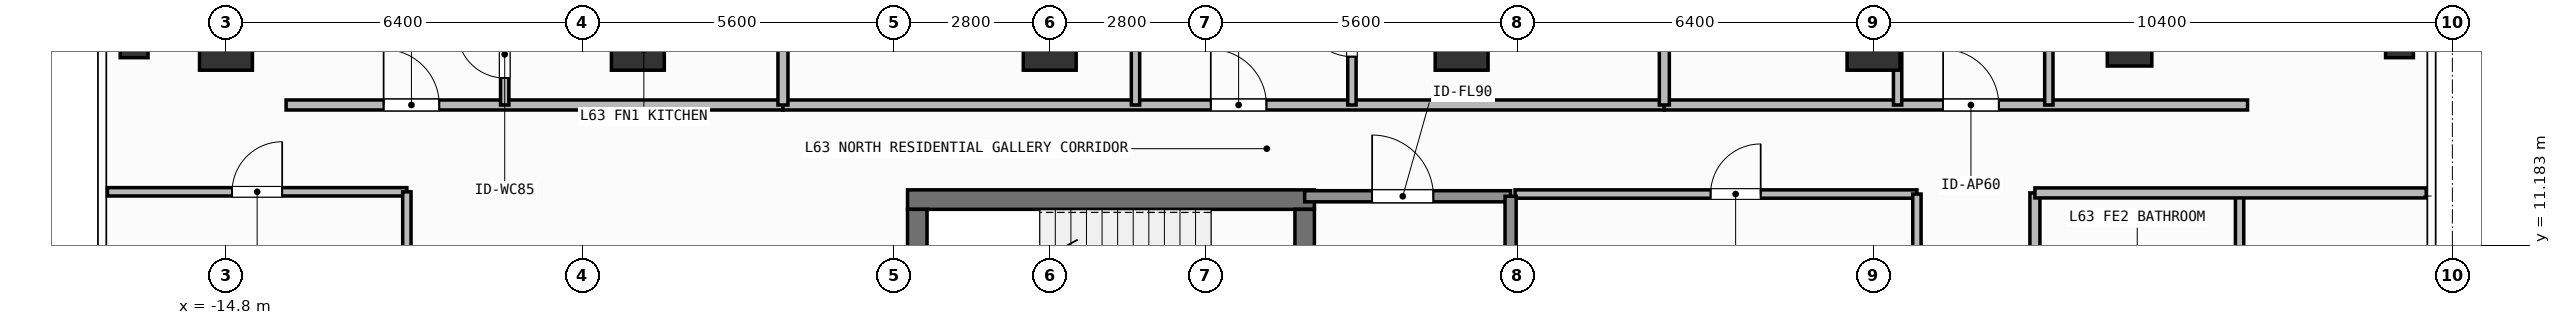
"""IFC4 building model, lengths in metres.
Left out: names, types, materials, properties, quantities, classifications, styles, units other than length and angle.
Written with IfcOpenShell. Run it as: python <this file> out.ifc"""

import sys

from ifc_helpers import new_model, si_unit, direction, frame, frame_2d, origin, origin_2d, place, context, subcontext, project, spatial, rectangle, hollow_rectangle, extrude, element, fill, save


model = new_model("IFC4")
c1 = context("Model", 3, precision=1e-05, world=origin(), true_north=direction((0.0, 1.0)))
c2 = subcontext(c1, "Body", "Model", "MODEL_VIEW")
j1 = project(units=[si_unit("LENGTHUNIT", "METRE"), si_unit("PLANEANGLEUNIT", "RADIAN")], contexts=[c1])
p1 = place(None, origin())
s1 = spatial("IfcSite", under=j1, at=p1, CompositionType="ELEMENT")
p2 = place(p1, origin())
s2 = spatial("IfcBuilding", under=s1, at=p2, CompositionType="ELEMENT")
p3 = place(p2, frame((0.0, 0.0, 258.6)))
s3 = spatial("IfcBuildingStorey", under=s2, at=p3, CompositionType="ELEMENT", Elevation=258.6)
p4 = place(p3, frame((-2.555, 12.0, 0.0), z_axis=(0.0, 0.0, 1.0), x_axis=(1.0, 0.0, 0.0)))
e1 = element("IfcWall", 1, at=p4, inside=s3, PredefinedType="SHEAR", context=c2, shape_type="SweptSolid", body=[
    extrude(rectangle(XDim=7.31, YDim=0.35, at=frame_2d((3.655, 0.0))), origin(), (0.0, 0.0, 1.0), 3.9),
])
p5 = place(p3, frame((-2.38, 8.9, 0.0), z_axis=(0.0, 0.0, 1.0), x_axis=(0.0, 1.0, 0.0)))
e2 = element("IfcWall", 2, at=p5, inside=s3, PredefinedType="SHEAR", context=c2, shape_type="SweptSolid", body=[
    extrude(rectangle(XDim=2.925, YDim=0.35, at=frame_2d((1.462, 0.0))), origin(), (0.0, 0.0, 1.0), 3.9),
])
p6 = place(p3, frame((4.58, 11.825, 0.0), z_axis=(0.0, 0.0, 1.0), x_axis=(0.0, -1.0, 0.0)))
e3 = element("IfcWall", 3, at=p6, inside=s3, PredefinedType="SHEAR", context=c2, shape_type="SweptSolid", body=[
    extrude(rectangle(XDim=2.925, YDim=0.35, at=frame_2d((1.462, 0.0))), origin(), (0.0, 0.0, 1.0), 3.9),
])
p7 = place(p6, frame((0.913, 0.0, 0.0)))
e4 = element("IfcOpeningElement", 4, at=p7, cuts=e3, PredefinedType="OPENING", context=c2, shape_type="SweptSolid", body=[
    extrude(rectangle(XDim=1.1, YDim=2.15, at=frame_2d((0.55, 1.075))), frame((0.0, 0.185, 0.0), z_axis=(0.0, -1.0, 0.0), x_axis=(1.0, 0.0, 0.0)), (0.0, 0.0, 1.0), 0.37),
])
for number, where, z_axis, x_axis in (
    (5, (-14.8, 14.8, 0.0), (0.0, 0.0, 1.0), (1.0, 0.0, 0.0)),
    (6, (-7.4, 14.8, 0.0), (0.0, 0.0, 1.0), (1.0, 0.0, 0.0)),
    (7, (0.0, 14.8, 0.0), (0.0, 0.0, 1.0), (1.0, 0.0, 0.0)),
    (8, (7.4, 14.8, 0.0), (0.0, 0.0, 1.0), (1.0, 0.0, 0.0)),
    (9, (14.8, 14.8, 0.0), (0.0, 0.0, 1.0), (1.0, 0.0, 0.0)),
):
    element("IfcColumn", number, at=place(p3, frame(where, z_axis=z_axis, x_axis=x_axis)), inside=s3, PredefinedType="COLUMN", context=c2, shape_type="SweptSolid", body=[
        extrude(rectangle(XDim=0.95, YDim=0.95, at=origin_2d()), origin(), (0.0, 0.0, 1.0), 3.9),
    ])
p8 = place(p3, frame((19.4, 14.8, 0.0), z_axis=(0.0, 0.0, 1.0), x_axis=(1.0, 0.0, 0.0)))
e10 = element("IfcColumn", 10, at=p8, inside=s3, PredefinedType="COLUMN", context=c2, shape_type="SweptSolid", body=[
    extrude(hollow_rectangle(XDim=0.8, YDim=0.8, WallThickness=0.036, at=origin_2d()), origin(), (0.0, 0.0, 1.0), 3.9),
])
for number, where, z_axis, x_axis in (
    (11, (-16.45, 14.8, 0.0), (0.0, 0.0, 1.0), (1.0, 0.0, 0.0)),
    (12, (24.25, 14.8, 0.0), (0.0, 0.0, 1.0), (1.0, 0.0, 0.0)),
):
    element("IfcColumn", number, at=place(p3, frame(where, z_axis=z_axis, x_axis=x_axis)), inside=s3, PredefinedType="COLUMN", context=c2, shape_type="SweptSolid", body=[
        extrude(hollow_rectangle(XDim=0.5, YDim=0.5, WallThickness=0.025, at=origin_2d()), origin(), (0.0, 0.0, 1.0), 3.9),
    ])
p9 = place(p3, frame((4.58, 12.06, 0.0), z_axis=(0.0, 0.0, 1.0), x_axis=(1.0, 0.0, 0.0)))
e13 = element("IfcWall", 13, at=p9, inside=s3, PredefinedType="SOLIDWALL", context=c2, shape_type="SweptSolid", body=[
    extrude(rectangle(XDim=3.7, YDim=0.2, at=frame_2d((1.85, 0.0))), origin(), (0.0, 0.0, 1.0), 3.68),
])
p10 = place(p9, frame((1.212, 0.0, 0.0)))
e14 = element("IfcOpeningElement", 14, at=p10, cuts=e13, PredefinedType="OPENING", context=c2, shape_type="SweptSolid", body=[
    extrude(rectangle(XDim=1.1, YDim=2.15, at=frame_2d((0.55, 1.075))), frame((0.0, 0.11, 0.0), z_axis=(0.0, -1.0, 0.0), x_axis=(1.0, 0.0, 0.0)), (0.0, 0.0, 1.0), 0.22),
])
p11 = place(p3, frame((8.36, 12.1, 0.0), z_axis=(0.0, 0.0, 1.0), x_axis=(1.0, 0.0, 0.0)))
e15 = element("IfcWall", 15, at=p11, inside=s3, PredefinedType="PARTITIONING", context=c2, shape_type="SweptSolid", body=[
    extrude(rectangle(XDim=7.22, YDim=0.15, at=frame_2d((3.61, 0.0))), origin(), (0.0, 0.0, 1.0), 3.68),
])
p12 = place(p11, frame((3.513, 0.0, 0.0)))
e16 = element("IfcOpeningElement", 16, at=p12, cuts=e15, PredefinedType="OPENING", context=c2, shape_type="SweptSolid", body=[
    extrude(rectangle(XDim=0.9, YDim=2.1, at=frame_2d((0.45, 1.05))), frame((0.0, 0.085, 0.0), z_axis=(0.0, -1.0, 0.0), x_axis=(1.0, 0.0, 0.0)), (0.0, 0.0, 1.0), 0.17),
])
p13 = place(p3, frame((-13.72, 13.7, 0.0), z_axis=(0.0, 0.0, 1.0), x_axis=(1.0, 0.0, 0.0)))
e17 = element("IfcWall", 17, at=p13, inside=s3, PredefinedType="PARTITIONING", context=c2, shape_type="SweptSolid", body=[
    extrude(rectangle(XDim=8.927, YDim=0.18, at=frame_2d((4.463, 0.0))), origin(), (0.0, 0.0, 1.0), 3.68),
])
p14 = place(p13, frame((1.752, 0.0, 0.0)))
e18 = element("IfcOpeningElement", 18, at=p14, cuts=e17, PredefinedType="OPENING", context=c2, shape_type="SweptSolid", body=[
    extrude(rectangle(XDim=1.0, YDim=2.2, at=frame_2d((0.5, 1.1))), frame((0.0, 0.1, 0.0), z_axis=(0.0, -1.0, 0.0), x_axis=(1.0, 0.0, 0.0)), (0.0, 0.0, 1.0), 0.2),
])
p15 = place(p3, frame((-9.792, 13.7, 0.0), z_axis=(0.0, 0.0, 1.0), x_axis=(0.0, 1.0, 0.0)))
e19 = element("IfcWall", 19, at=p15, inside=s3, PredefinedType="PARTITIONING", context=c2, shape_type="SweptSolid", body=[
    extrude(rectangle(XDim=1.982, YDim=0.15, at=frame_2d((0.991, 0.0))), origin(), (0.0, 0.0, 1.0), 3.68),
])
p16 = place(p15, frame((0.485, 0.0, 0.0)))
e20 = element("IfcOpeningElement", 20, at=p16, cuts=e19, PredefinedType="OPENING", context=c2, shape_type="SweptSolid", body=[
    extrude(rectangle(XDim=0.85, YDim=2.1, at=frame_2d((0.425, 1.05))), frame((0.0, 0.085, 0.0), z_axis=(0.0, -1.0, 0.0), x_axis=(1.0, 0.0, 0.0)), (0.0, 0.0, 1.0), 0.17),
])
p17 = place(p3, frame((-4.793, 13.7, 0.0), z_axis=(0.0, 0.0, 1.0), x_axis=(1.0, 0.0, 0.0)))
e21 = element("IfcWall", 21, at=p17, inside=s3, PredefinedType="PARTITIONING", context=c2, shape_type="SweptSolid", body=[
    extrude(rectangle(XDim=15.835, YDim=0.18, at=frame_2d((7.917, 0.0))), origin(), (0.0, 0.0, 1.0), 3.68),
])
p18 = place(p17, frame((7.686, 0.0, 0.0)))
e22 = element("IfcOpeningElement", 22, at=p18, cuts=e21, PredefinedType="OPENING", context=c2, shape_type="SweptSolid", body=[
    extrude(rectangle(XDim=1.0, YDim=2.2, at=frame_2d((0.5, 1.1))), frame((0.0, 0.1, 0.0), z_axis=(0.0, -1.0, 0.0), x_axis=(1.0, 0.0, 0.0)), (0.0, 0.0, 1.0), 0.2),
])
p19 = place(p3, frame((1.541, 13.7, 0.0), z_axis=(0.0, 0.0, 1.0), x_axis=(0.0, 1.0, 0.0)))
e23 = element("IfcWall", 23, at=p19, inside=s3, PredefinedType="PARTITIONING", context=c2, shape_type="SweptSolid", body=[
    extrude(rectangle(XDim=4.147, YDim=0.15, at=frame_2d((2.073, 0.0))), origin(), (0.0, 0.0, 1.0), 3.68),
])
p20 = place(p19, frame((1.736, 0.0, 0.0)))
e24 = element("IfcOpeningElement", 24, at=p20, cuts=e23, PredefinedType="OPENING", context=c2, shape_type="SweptSolid", body=[
    extrude(rectangle(XDim=0.85, YDim=2.1, at=frame_2d((0.425, 1.05))), frame((0.0, 0.085, 0.0), z_axis=(0.0, -1.0, 0.0), x_axis=(1.0, 0.0, 0.0)), (0.0, 0.0, 1.0), 0.17),
])
p21 = place(p3, frame((5.429, 13.7, 0.0), z_axis=(0.0, 0.0, 1.0), x_axis=(0.0, 1.0, 0.0)))
e25 = element("IfcWall", 25, at=p21, inside=s3, PredefinedType="PARTITIONING", context=c2, shape_type="SweptSolid", body=[
    extrude(rectangle(XDim=2.588, YDim=0.15, at=frame_2d((1.294, 0.0))), origin(), (0.0, 0.0, 1.0), 3.68),
])
p22 = place(p21, frame((0.869, 0.0, 0.0)))
e26 = element("IfcOpeningElement", 26, at=p22, cuts=e25, PredefinedType="OPENING", context=c2, shape_type="SweptSolid", body=[
    extrude(rectangle(XDim=0.85, YDim=2.1, at=frame_2d((0.425, 1.05))), frame((0.0, 0.085, 0.0), z_axis=(0.0, -1.0, 0.0), x_axis=(1.0, 0.0, 0.0)), (0.0, 0.0, 1.0), 0.17),
])
p23 = place(p3, frame((11.042, 13.7, 0.0), z_axis=(0.0, 0.0, 1.0), x_axis=(1.0, 0.0, 0.0)))
e27 = element("IfcWall", 27, at=p23, inside=s3, PredefinedType="PARTITIONING", context=c2, shape_type="SweptSolid", body=[
    extrude(rectangle(XDim=10.478, YDim=0.18, at=frame_2d((5.239, 0.0))), origin(), (0.0, 0.0, 1.0), 3.68),
])
p24 = place(p23, frame((5.008, 0.0, 0.0)))
e28 = element("IfcOpeningElement", 28, at=p24, cuts=e27, PredefinedType="OPENING", context=c2, shape_type="SweptSolid", body=[
    extrude(rectangle(XDim=1.0, YDim=2.2, at=frame_2d((0.5, 1.1))), frame((0.0, 0.1, 0.0), z_axis=(0.0, -1.0, 0.0), x_axis=(1.0, 0.0, 0.0)), (0.0, 0.0, 1.0), 0.2),
])
p25 = place(p3, frame((15.233, 13.7, 0.0), z_axis=(0.0, 0.0, 1.0), x_axis=(0.0, 1.0, 0.0)))
e29 = element("IfcWall", 29, at=p25, inside=s3, PredefinedType="PARTITIONING", context=c2, shape_type="SweptSolid", body=[
    extrude(rectangle(XDim=4.25, YDim=0.15, at=frame_2d((2.125, 0.0))), origin(), (0.0, 0.0, 1.0), 3.68),
])
p26 = place(p25, frame((1.7, 0.0, 0.0)))
e30 = element("IfcOpeningElement", 30, at=p26, cuts=e29, PredefinedType="OPENING", context=c2, shape_type="SweptSolid", body=[
    extrude(rectangle(XDim=0.85, YDim=2.1, at=frame_2d((0.425, 1.05))), frame((0.0, 0.085, 0.0), z_axis=(0.0, -1.0, 0.0), x_axis=(1.0, 0.0, 0.0)), (0.0, 0.0, 1.0), 0.17),
])
p27 = place(p3, frame((17.95, 13.7, 0.0), z_axis=(0.0, 0.0, 1.0), x_axis=(0.0, 1.0, 0.0)))
e31 = element("IfcWall", 31, at=p27, inside=s3, PredefinedType="PARTITIONING", context=c2, shape_type="SweptSolid", body=[
    extrude(rectangle(XDim=4.25, YDim=0.15, at=frame_2d((2.125, 0.0))), origin(), (0.0, 0.0, 1.0), 3.68),
])
p28 = place(p27, frame((1.7, 0.0, 0.0)))
e32 = element("IfcOpeningElement", 32, at=p28, cuts=e31, PredefinedType="OPENING", context=c2, shape_type="SweptSolid", body=[
    extrude(rectangle(XDim=0.85, YDim=2.1, at=frame_2d((0.425, 1.05))), frame((0.0, 0.085, 0.0), z_axis=(0.0, -1.0, 0.0), x_axis=(1.0, 0.0, 0.0)), (0.0, 0.0, 1.0), 0.17),
])
p29 = place(p3, frame((-16.93, 12.14, 0.0), z_axis=(0.0, 0.0, 1.0), x_axis=(1.0, 0.0, 0.0)))
e33 = element("IfcWall", 33, at=p29, inside=s3, PredefinedType="PARTITIONING", context=c2, shape_type="SweptSolid", body=[
    extrude(rectangle(XDim=5.38, YDim=0.15, at=frame_2d((2.69, 0.0))), origin(), (0.0, 0.0, 1.0), 3.68),
])
p30 = place(p29, frame((2.24, 0.0, 0.0)))
e34 = element("IfcOpeningElement", 34, at=p30, cuts=e33, PredefinedType="OPENING", context=c2, shape_type="SweptSolid", body=[
    extrude(rectangle(XDim=0.9, YDim=2.1, at=frame_2d((0.45, 1.05))), frame((0.0, 0.085, 0.0), z_axis=(0.0, -1.0, 0.0), x_axis=(1.0, 0.0, 0.0)), (0.0, 0.0, 1.0), 0.17),
])
p31 = place(p3, frame((17.7, 1.454, 0.0), z_axis=(0.0, 0.0, 1.0), x_axis=(0.0, 1.0, 0.0)))
e35 = element("IfcWall", 35, at=p31, inside=s3, PredefinedType="PARTITIONING", context=c2, shape_type="SweptSolid", body=[
    extrude(rectangle(XDim=10.666, YDim=0.18, at=frame_2d((5.333, 0.0))), origin(), (0.0, 0.0, 1.0), 3.68),
])
p32 = place(p31, frame((4.473, 0.0, 0.0)))
e36 = element("IfcOpeningElement", 36, at=p32, cuts=e35, PredefinedType="OPENING", context=c2, shape_type="SweptSolid", body=[
    extrude(rectangle(XDim=1.0, YDim=2.2, at=frame_2d((0.5, 1.1))), frame((0.0, 0.1, 0.0), z_axis=(0.0, -1.0, 0.0), x_axis=(1.0, 0.0, 0.0)), (0.0, 0.0, 1.0), 0.2),
])
p33 = place(p3, frame((8.28, 8.725, 0.0), z_axis=(0.0, 0.0, 1.0), x_axis=(0.0, 1.0, 0.0)))
e37 = element("IfcWall", 37, at=p33, inside=s3, PredefinedType="SOLIDWALL", context=c2, shape_type="SweptSolid", body=[
    extrude(rectangle(XDim=3.335, YDim=0.2, at=frame_2d((1.667, 0.0))), origin(), (0.0, 0.0, 1.0), 3.68),
])
p34 = place(p3, frame((15.58, 5.85, 0.0), z_axis=(0.0, 0.0, 1.0), x_axis=(0.0, 1.0, 0.0)))
e38 = element("IfcWall", 38, at=p34, inside=s3, PredefinedType="PARTITIONING", context=c2, shape_type="SweptSolid", body=[
    extrude(rectangle(XDim=6.25, YDim=0.15, at=frame_2d((3.125, 0.0))), origin(), (0.0, 0.0, 1.0), 3.68),
])
p35 = place(p3, frame((-4.793, 13.7, 0.0), z_axis=(0.0, 0.0, 1.0), x_axis=(0.0, 1.0, 0.0)))
e39 = element("IfcWall", 39, at=p35, inside=s3, PredefinedType="PARTITIONING", context=c2, shape_type="SweptSolid", body=[
    extrude(rectangle(XDim=7.33, YDim=0.18, at=frame_2d((3.665, 0.0))), origin(), (0.0, 0.0, 1.0), 3.68),
])
p36 = place(p3, frame((11.042, 13.7, 0.0), z_axis=(0.0, 0.0, 1.0), x_axis=(0.0, 1.0, 0.0)))
e40 = element("IfcWall", 40, at=p36, inside=s3, PredefinedType="PARTITIONING", context=c2, shape_type="SweptSolid", body=[
    extrude(rectangle(XDim=7.33, YDim=0.18, at=frame_2d((3.665, 0.0))), origin(), (0.0, 0.0, 1.0), 3.42),
])
p37 = place(p3, frame((-11.55, 1.8, 0.0), z_axis=(0.0, 0.0, 1.0), x_axis=(0.0, 1.0, 0.0)))
e41 = element("IfcWall", 41, at=p37, inside=s3, PredefinedType="PARTITIONING", context=c2, shape_type="SweptSolid", body=[
    extrude(rectangle(XDim=10.34, YDim=0.15, at=frame_2d((5.17, 0.0))), origin(), (0.0, 0.0, 1.0), 3.68),
])
p38 = place(p3, frame((21.377, 8.828, 0.0), z_axis=(0.0, 0.0, 1.0), x_axis=(0.0, 1.0, 0.0)))
e42 = element("IfcWall", 42, at=p38, inside=s3, PredefinedType="PARTITIONING", context=c2, shape_type="SweptSolid", body=[
    extrude(rectangle(XDim=3.292, YDim=0.15, at=frame_2d((1.646, 0.0))), origin(), (0.0, 0.0, 1.0), 3.68),
])
p39 = place(p3, frame((17.7, 12.12, 0.0), z_axis=(0.0, 0.0, 1.0), x_axis=(1.0, 0.0, 0.0)))
e43 = element("IfcWall", 43, at=p39, inside=s3, PredefinedType="PARTITIONING", context=c2, shape_type="SweptSolid", body=[
    extrude(rectangle(XDim=7.03, YDim=0.18, at=frame_2d((3.515, 0.0))), origin(), (0.0, 0.0, 1.0), 3.68),
])
p40 = place(p10, origin())
e44 = element("IfcDoor", 44, at=p40, inside=s3, OperationType="SINGLE_SWING_LEFT", PredefinedType="DOOR", context=c2, shape_type="SweptSolid", body=[
    extrude(rectangle(XDim=1.1, YDim=2.15, at=frame_2d((0.55, 1.075))), frame((0.0, 0.025, 0.0), z_axis=(0.0, -1.0, 0.0), x_axis=(1.0, 0.0, 0.0)), (0.0, 0.0, 1.0), 0.05),
])
fill(e14, e44)
p41 = place(p12, origin())
e45 = element("IfcDoor", 45, at=p41, inside=s3, OperationType="SINGLE_SWING_RIGHT", PredefinedType="DOOR", context=c2, shape_type="SweptSolid", body=[
    extrude(rectangle(XDim=0.9, YDim=2.1, at=frame_2d((0.45, 1.05))), frame((0.0, 0.025, 0.0), z_axis=(0.0, -1.0, 0.0), x_axis=(1.0, 0.0, 0.0)), (0.0, 0.0, 1.0), 0.05),
])
fill(e16, e45)
p42 = place(p14, origin())
e46 = element("IfcDoor", 46, at=p42, inside=s3, OperationType="SINGLE_SWING_LEFT", PredefinedType="DOOR", context=c2, shape_type="SweptSolid", body=[
    extrude(rectangle(XDim=1.0, YDim=2.2, at=frame_2d((0.5, 1.1))), frame((0.0, 0.025, 0.0), z_axis=(0.0, -1.0, 0.0), x_axis=(1.0, 0.0, 0.0)), (0.0, 0.0, 1.0), 0.05),
])
fill(e18, e46)
p43 = place(p16, origin())
e47 = element("IfcDoor", 47, at=p43, inside=s3, OperationType="SINGLE_SWING_RIGHT", PredefinedType="DOOR", context=c2, shape_type="SweptSolid", body=[
    extrude(rectangle(XDim=0.85, YDim=2.1, at=frame_2d((0.425, 1.05))), frame((0.0, 0.025, 0.0), z_axis=(0.0, -1.0, 0.0), x_axis=(1.0, 0.0, 0.0)), (0.0, 0.0, 1.0), 0.05),
])
fill(e20, e47)
p44 = place(p18, origin())
e48 = element("IfcDoor", 48, at=p44, inside=s3, OperationType="SINGLE_SWING_LEFT", PredefinedType="DOOR", context=c2, shape_type="SweptSolid", body=[
    extrude(rectangle(XDim=1.0, YDim=2.2, at=frame_2d((0.5, 1.1))), frame((0.0, 0.025, 0.0), z_axis=(0.0, -1.0, 0.0), x_axis=(1.0, 0.0, 0.0)), (0.0, 0.0, 1.0), 0.05),
])
fill(e22, e48)
p45 = place(p22, origin())
e49 = element("IfcDoor", 49, at=p45, inside=s3, OperationType="SINGLE_SWING_RIGHT", PredefinedType="DOOR", context=c2, shape_type="SweptSolid", body=[
    extrude(rectangle(XDim=0.85, YDim=2.1, at=frame_2d((0.425, 1.05))), frame((0.0, 0.025, 0.0), z_axis=(0.0, -1.0, 0.0), x_axis=(1.0, 0.0, 0.0)), (0.0, 0.0, 1.0), 0.05),
])
fill(e26, e49)
p46 = place(p24, origin())
e50 = element("IfcDoor", 50, at=p46, inside=s3, OperationType="SINGLE_SWING_LEFT", PredefinedType="DOOR", context=c2, shape_type="SweptSolid", body=[
    extrude(rectangle(XDim=1.0, YDim=2.2, at=frame_2d((0.5, 1.1))), frame((0.0, 0.025, 0.0), z_axis=(0.0, -1.0, 0.0), x_axis=(1.0, 0.0, 0.0)), (0.0, 0.0, 1.0), 0.05),
])
fill(e28, e50)
p47 = place(p30, origin())
e51 = element("IfcDoor", 51, at=p47, inside=s3, OperationType="SINGLE_SWING_RIGHT", PredefinedType="DOOR", context=c2, shape_type="SweptSolid", body=[
    extrude(rectangle(XDim=0.9, YDim=2.1, at=frame_2d((0.45, 1.05))), frame((0.0, 0.025, 0.0), z_axis=(0.0, -1.0, 0.0), x_axis=(1.0, 0.0, 0.0)), (0.0, 0.0, 1.0), 0.05),
])
fill(e34, e51)
save(model, sys.argv[1])
